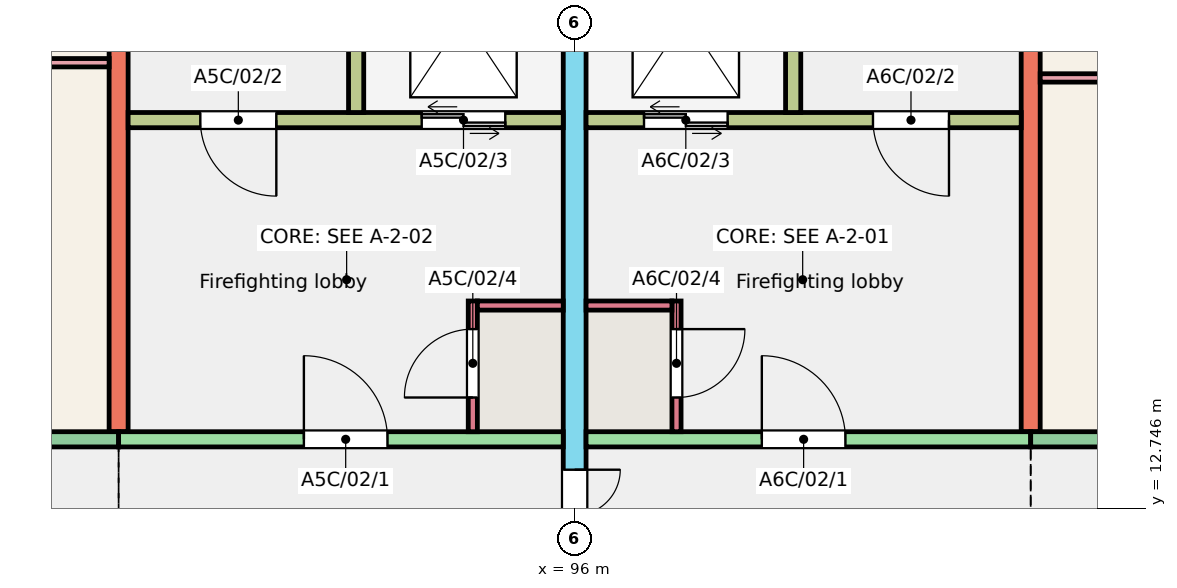
"""IFC4 building model, lengths in metres.
Left out: names, types, materials, properties, quantities, classifications, styles, units other than length and angle.
Written with IfcOpenShell. Run it as: python <this file> out.ifc"""

import sys

from ifc_helpers import new_model, si_unit, direction, frame, frame_2d, origin, place, context, subcontext, project, spatial, rectangle, extrude, element, fill, save


model = new_model("IFC4")
c1 = context("Model", 3, precision=1e-05, world=origin(), true_north=direction((0.0, 1.0)))
c2 = subcontext(c1, "Body", "Model", "MODEL_VIEW")
j1 = project(units=[si_unit("LENGTHUNIT", "METRE"), si_unit("PLANEANGLEUNIT", "RADIAN")], contexts=[c1])
p1 = place(None, origin())
s1 = spatial("IfcSite", under=j1, at=p1, CompositionType="ELEMENT")
p2 = place(p1, origin())
s2 = spatial("IfcBuilding", under=s1, at=p2, CompositionType="ELEMENT")
p3 = place(p2, frame((0.0, 0.0, 6.0)))
s3 = spatial("IfcBuildingStorey", under=s2, at=p3, CompositionType="ELEMENT", Elevation=6.0)
p4 = place(p3, frame((90.0, 13.75, 0.0), z_axis=(0.0, 0.0, 1.0), x_axis=(0.0, 1.0, 0.0)))
e1 = element("IfcWall", 1, at=p4, inside=s3, PredefinedType="SHEAR", context=c2, shape_type="SweptSolid", body=[
    extrude(rectangle(XDim=9.0, YDim=0.25, at=frame_2d((4.5, 0.0))), origin(), (0.0, 0.0, 1.0), 3.0),
])
p5 = place(p3, frame((96.0, 11.75, 0.0), z_axis=(0.0, 0.0, 1.0), x_axis=(0.0, 1.0, 0.0)))
e2 = element("IfcWall", 2, at=p5, inside=s3, PredefinedType="SHEAR", context=c2, shape_type="SweptSolid", body=[
    extrude(rectangle(XDim=11.0, YDim=0.3, at=frame_2d((5.5, 0.0))), origin(), (0.0, 0.0, 1.0), 3.0),
])
p6 = place(p5, frame((0.3, 0.0, 0.0)))
e3 = element("IfcOpeningElement", 3, at=p6, cuts=e2, PredefinedType="OPENING", context=c2, shape_type="SweptSolid", body=[
    extrude(rectangle(XDim=1.2, YDim=2.1, at=frame_2d((0.6, 1.05))), frame((0.0, 0.16, 0.0), z_axis=(0.0, -1.0, 0.0), x_axis=(1.0, 0.0, 0.0)), (0.0, 0.0, 1.0), 0.32),
])
p7 = place(p3, frame((102.0, 13.75, 0.0), z_axis=(0.0, 0.0, 1.0), x_axis=(0.0, 1.0, 0.0)))
e4 = element("IfcWall", 4, at=p7, inside=s3, PredefinedType="SHEAR", context=c2, shape_type="SweptSolid", body=[
    extrude(rectangle(XDim=9.0, YDim=0.25, at=frame_2d((4.5, 0.0))), origin(), (0.0, 0.0, 1.0), 3.0),
])
p8 = place(p3, frame((86.4, 13.65, 0.0), z_axis=(0.0, 0.0, 1.0), x_axis=(1.0, 0.0, 0.0)))
e5 = element("IfcWall", 5, at=p8, inside=s3, PredefinedType="SOLIDWALL", context=c2, shape_type="SweptSolid", body=[
    extrude(rectangle(XDim=3.6, YDim=0.2, at=frame_2d((1.8, 0.0))), origin(), (0.0, 0.0, 1.0), 3.0),
])
p9 = place(p8, frame((1.2, 0.0, 0.8)))
e6 = element("IfcOpeningElement", 6, at=p9, cuts=e5, PredefinedType="OPENING", context=c2, shape_type="SweptSolid", body=[
    extrude(rectangle(XDim=1.2, YDim=1.6, at=frame_2d((0.6, 0.8))), frame((0.0, 0.11, 0.0), z_axis=(0.0, -1.0, 0.0), x_axis=(1.0, 0.0, 0.0)), (0.0, 0.0, 1.0), 0.22),
])
p10 = place(p3, frame((90.0, 13.65, 0.0), z_axis=(0.0, 0.0, 1.0), x_axis=(1.0, 0.0, 0.0)))
e7 = element("IfcWall", 7, at=p10, inside=s3, PredefinedType="SHEAR", context=c2, shape_type="SweptSolid", body=[
    extrude(rectangle(XDim=5.85, YDim=0.2, at=frame_2d((2.925, 0.0))), origin(), (0.0, 0.0, 1.0), 3.0),
])
p11 = place(p10, frame((2.438, 0.0, 0.0)))
e8 = element("IfcOpeningElement", 8, at=p11, cuts=e7, PredefinedType="OPENING", context=c2, shape_type="SweptSolid", body=[
    extrude(rectangle(XDim=1.1, YDim=2.1, at=frame_2d((0.55, 1.05))), frame((0.0, 0.11, 0.0), z_axis=(0.0, -1.0, 0.0), x_axis=(1.0, 0.0, 0.0)), (0.0, 0.0, 1.0), 0.22),
])
p12 = place(p3, frame((90.125, 17.85, 0.0), z_axis=(0.0, 0.0, 1.0), x_axis=(1.0, 0.0, 0.0)))
e9 = element("IfcWall", 9, at=p12, inside=s3, PredefinedType="SHEAR", context=c2, shape_type="SweptSolid", body=[
    extrude(rectangle(XDim=5.725, YDim=0.2, at=frame_2d((2.863, 0.0))), origin(), (0.0, 0.0, 1.0), 3.0),
])
p13 = place(p12, frame((0.95, 0.0, 0.0)))
e10 = element("IfcOpeningElement", 10, at=p13, cuts=e9, PredefinedType="OPENING", context=c2, shape_type="SweptSolid", body=[
    extrude(rectangle(XDim=1.0, YDim=2.1, at=frame_2d((0.5, 1.05))), frame((0.0, 0.11, 0.0), z_axis=(0.0, -1.0, 0.0), x_axis=(1.0, 0.0, 0.0)), (0.0, 0.0, 1.0), 0.22),
])
p14 = place(p12, frame((3.863, 0.0, 0.0)))
e11 = element("IfcOpeningElement", 11, at=p14, cuts=e9, PredefinedType="OPENING", context=c2, shape_type="SweptSolid", body=[
    extrude(rectangle(XDim=1.1, YDim=2.1, at=frame_2d((0.55, 1.05))), frame((0.0, 0.11, 0.0), z_axis=(0.0, -1.0, 0.0), x_axis=(1.0, 0.0, 0.0)), (0.0, 0.0, 1.0), 0.22),
])
p15 = place(p3, frame((93.125, 17.95, 0.0), z_axis=(0.0, 0.0, 1.0), x_axis=(0.0, 1.0, 0.0)))
e12 = element("IfcWall", 12, at=p15, inside=s3, PredefinedType="SHEAR", context=c2, shape_type="SweptSolid", body=[
    extrude(rectangle(XDim=4.8, YDim=0.2, at=frame_2d((2.4, 0.0))), origin(), (0.0, 0.0, 1.0), 3.0),
])
p16 = place(p3, frame((94.66, 13.75, 0.0), z_axis=(0.0, 0.0, 1.0), x_axis=(0.0, 1.0, 0.0)))
e13 = element("IfcWall", 13, at=p16, inside=s3, PredefinedType="SHEAR", context=c2, shape_type="SweptSolid", body=[
    extrude(rectangle(XDim=1.72, YDim=0.12, at=frame_2d((0.86, 0.0))), origin(), (0.0, 0.0, 1.0), 3.0),
])
p17 = place(p16, frame((0.45, 0.0, 0.0)))
e14 = element("IfcOpeningElement", 14, at=p17, cuts=e13, PredefinedType="OPENING", context=c2, shape_type="SweptSolid", body=[
    extrude(rectangle(XDim=0.9, YDim=2.1, at=frame_2d((0.45, 1.05))), frame((0.0, 0.07, 0.0), z_axis=(0.0, -1.0, 0.0), x_axis=(1.0, 0.0, 0.0)), (0.0, 0.0, 1.0), 0.14),
])
p18 = place(p3, frame((94.72, 15.41, 0.0), z_axis=(0.0, 0.0, 1.0), x_axis=(1.0, 0.0, 0.0)))
e15 = element("IfcWall", 15, at=p18, inside=s3, PredefinedType="SHEAR", context=c2, shape_type="SweptSolid", body=[
    extrude(rectangle(XDim=1.13, YDim=0.12, at=frame_2d((0.565, 0.0))), origin(), (0.0, 0.0, 1.0), 3.0),
])
p19 = place(p3, frame((96.15, 13.65, 0.0), z_axis=(0.0, 0.0, 1.0), x_axis=(1.0, 0.0, 0.0)))
e16 = element("IfcWall", 16, at=p19, inside=s3, PredefinedType="SHEAR", context=c2, shape_type="SweptSolid", body=[
    extrude(rectangle(XDim=5.85, YDim=0.2, at=frame_2d((2.925, 0.0))), origin(), (0.0, 0.0, 1.0), 3.0),
])
p20 = place(p19, frame((2.312, 0.0, 0.0)))
e17 = element("IfcOpeningElement", 17, at=p20, cuts=e16, PredefinedType="OPENING", context=c2, shape_type="SweptSolid", body=[
    extrude(rectangle(XDim=1.1, YDim=2.1, at=frame_2d((0.55, 1.05))), frame((0.0, 0.11, 0.0), z_axis=(0.0, -1.0, 0.0), x_axis=(1.0, 0.0, 0.0)), (0.0, 0.0, 1.0), 0.22),
])
p21 = place(p3, frame((96.15, 17.85, 0.0), z_axis=(0.0, 0.0, 1.0), x_axis=(1.0, 0.0, 0.0)))
e18 = element("IfcWall", 18, at=p21, inside=s3, PredefinedType="SHEAR", context=c2, shape_type="SweptSolid", body=[
    extrude(rectangle(XDim=5.725, YDim=0.2, at=frame_2d((2.863, 0.0))), origin(), (0.0, 0.0, 1.0), 3.0),
])
p22 = place(p21, frame((3.775, 0.0, 0.0)))
e19 = element("IfcOpeningElement", 19, at=p22, cuts=e18, PredefinedType="OPENING", context=c2, shape_type="SweptSolid", body=[
    extrude(rectangle(XDim=1.0, YDim=2.1, at=frame_2d((0.5, 1.05))), frame((0.0, 0.11, 0.0), z_axis=(0.0, -1.0, 0.0), x_axis=(1.0, 0.0, 0.0)), (0.0, 0.0, 1.0), 0.22),
])
p23 = place(p21, frame((0.762, 0.0, 0.0)))
e20 = element("IfcOpeningElement", 20, at=p23, cuts=e18, PredefinedType="OPENING", context=c2, shape_type="SweptSolid", body=[
    extrude(rectangle(XDim=1.1, YDim=2.1, at=frame_2d((0.55, 1.05))), frame((0.0, 0.11, 0.0), z_axis=(0.0, -1.0, 0.0), x_axis=(1.0, 0.0, 0.0)), (0.0, 0.0, 1.0), 0.22),
])
p24 = place(p3, frame((98.875, 17.95, 0.0), z_axis=(0.0, 0.0, 1.0), x_axis=(0.0, 1.0, 0.0)))
e21 = element("IfcWall", 21, at=p24, inside=s3, PredefinedType="SHEAR", context=c2, shape_type="SweptSolid", body=[
    extrude(rectangle(XDim=4.8, YDim=0.2, at=frame_2d((2.4, 0.0))), origin(), (0.0, 0.0, 1.0), 3.0),
])
p25 = place(p3, frame((97.34, 13.75, 0.0), z_axis=(0.0, 0.0, 1.0), x_axis=(0.0, 1.0, 0.0)))
e22 = element("IfcWall", 22, at=p25, inside=s3, PredefinedType="SHEAR", context=c2, shape_type="SweptSolid", body=[
    extrude(rectangle(XDim=1.72, YDim=0.12, at=frame_2d((0.86, 0.0))), origin(), (0.0, 0.0, 1.0), 3.0),
])
p26 = place(p25, frame((0.45, 0.0, 0.0)))
e23 = element("IfcOpeningElement", 23, at=p26, cuts=e22, PredefinedType="OPENING", context=c2, shape_type="SweptSolid", body=[
    extrude(rectangle(XDim=0.9, YDim=2.1, at=frame_2d((0.45, 1.05))), frame((0.0, 0.07, 0.0), z_axis=(0.0, -1.0, 0.0), x_axis=(1.0, 0.0, 0.0)), (0.0, 0.0, 1.0), 0.14),
])
p27 = place(p3, frame((96.15, 15.41, 0.0), z_axis=(0.0, 0.0, 1.0), x_axis=(1.0, 0.0, 0.0)))
e24 = element("IfcWall", 24, at=p27, inside=s3, PredefinedType="SHEAR", context=c2, shape_type="SweptSolid", body=[
    extrude(rectangle(XDim=1.13, YDim=0.12, at=frame_2d((0.565, 0.0))), origin(), (0.0, 0.0, 1.0), 3.0),
])
p28 = place(p3, frame((102.0, 13.65, 0.0), z_axis=(0.0, 0.0, 1.0), x_axis=(1.0, 0.0, 0.0)))
e25 = element("IfcWall", 25, at=p28, inside=s3, PredefinedType="SOLIDWALL", context=c2, shape_type="SweptSolid", body=[
    extrude(rectangle(XDim=3.6, YDim=0.2, at=frame_2d((1.8, 0.0))), origin(), (0.0, 0.0, 1.0), 3.0),
])
p29 = place(p28, frame((1.2, 0.0, 0.8)))
e26 = element("IfcOpeningElement", 26, at=p29, cuts=e25, PredefinedType="OPENING", context=c2, shape_type="SweptSolid", body=[
    extrude(rectangle(XDim=1.2, YDim=1.6, at=frame_2d((0.6, 0.8))), frame((0.0, 0.11, 0.0), z_axis=(0.0, -1.0, 0.0), x_axis=(1.0, 0.0, 0.0)), (0.0, 0.0, 1.0), 0.22),
])
for number, where, z_axis, x_axis in (
    (27, (86.525, 18.605, 0.0), (0.0, 0.0, 1.0), (1.0, 0.0, 0.0)),
    (28, (102.125, 18.405, 0.0), (0.0, 0.0, 1.0), (1.0, 0.0, 0.0)),
):
    element("IfcWall", number, at=place(p3, frame(where, z_axis=z_axis, x_axis=x_axis)), inside=s3, PredefinedType="PARTITIONING", context=c2, shape_type="SweptSolid", body=[
        extrude(rectangle(XDim=3.35, YDim=0.11, at=frame_2d((1.675, 0.0))), origin(), (0.0, 0.0, 1.0), 2.8),
    ])
p30 = place(p11, origin())
e29 = element("IfcDoor", 29, at=p30, inside=s3, OperationType="SINGLE_SWING_LEFT", PredefinedType="DOOR", context=c2, shape_type="SweptSolid", body=[
    extrude(rectangle(XDim=1.1, YDim=2.1, at=frame_2d((0.55, 1.05))), frame((0.0, 0.025, 0.0), z_axis=(0.0, -1.0, 0.0), x_axis=(1.0, 0.0, 0.0)), (0.0, 0.0, 1.0), 0.05),
])
fill(e8, e29)
p31 = place(p13, origin())
e30 = element("IfcDoor", 30, at=p31, inside=s3, OperationType="SINGLE_SWING_RIGHT", PredefinedType="DOOR", context=c2, shape_type="SweptSolid", body=[
    extrude(rectangle(XDim=1.0, YDim=2.1, at=frame_2d((0.5, 1.05))), frame((0.0, 0.025, 0.0), z_axis=(0.0, -1.0, 0.0), x_axis=(1.0, 0.0, 0.0)), (0.0, 0.0, 1.0), 0.05),
])
fill(e10, e30)
p32 = place(p14, origin())
e31 = element("IfcDoor", 31, at=p32, inside=s3, OperationType="DOUBLE_DOOR_SLIDING", PredefinedType="DOOR", context=c2, shape_type="SweptSolid", body=[
    extrude(rectangle(XDim=1.1, YDim=2.1, at=frame_2d((0.55, 1.05))), frame((0.0, 0.025, 0.0), z_axis=(0.0, -1.0, 0.0), x_axis=(1.0, 0.0, 0.0)), (0.0, 0.0, 1.0), 0.05),
])
fill(e11, e31)
p33 = place(p17, origin())
e32 = element("IfcDoor", 32, at=p33, inside=s3, OperationType="SINGLE_SWING_LEFT", PredefinedType="DOOR", context=c2, shape_type="SweptSolid", body=[
    extrude(rectangle(XDim=0.9, YDim=2.1, at=frame_2d((0.45, 1.05))), frame((0.0, 0.025, 0.0), z_axis=(0.0, -1.0, 0.0), x_axis=(1.0, 0.0, 0.0)), (0.0, 0.0, 1.0), 0.05),
])
fill(e14, e32)
p34 = place(p20, origin())
e33 = element("IfcDoor", 33, at=p34, inside=s3, OperationType="SINGLE_SWING_LEFT", PredefinedType="DOOR", context=c2, shape_type="SweptSolid", body=[
    extrude(rectangle(XDim=1.1, YDim=2.1, at=frame_2d((0.55, 1.05))), frame((0.0, 0.025, 0.0), z_axis=(0.0, -1.0, 0.0), x_axis=(1.0, 0.0, 0.0)), (0.0, 0.0, 1.0), 0.05),
])
fill(e17, e33)
p35 = place(p22, origin())
e34 = element("IfcDoor", 34, at=p35, inside=s3, OperationType="SINGLE_SWING_RIGHT", PredefinedType="DOOR", context=c2, shape_type="SweptSolid", body=[
    extrude(rectangle(XDim=1.0, YDim=2.1, at=frame_2d((0.5, 1.05))), frame((0.0, 0.025, 0.0), z_axis=(0.0, -1.0, 0.0), x_axis=(1.0, 0.0, 0.0)), (0.0, 0.0, 1.0), 0.05),
])
fill(e19, e34)
p36 = place(p23, origin())
e35 = element("IfcDoor", 35, at=p36, inside=s3, OperationType="DOUBLE_DOOR_SLIDING", PredefinedType="DOOR", context=c2, shape_type="SweptSolid", body=[
    extrude(rectangle(XDim=1.1, YDim=2.1, at=frame_2d((0.55, 1.05))), frame((0.0, 0.025, 0.0), z_axis=(0.0, -1.0, 0.0), x_axis=(1.0, 0.0, 0.0)), (0.0, 0.0, 1.0), 0.05),
])
fill(e20, e35)
p37 = place(p26, origin())
e36 = element("IfcDoor", 36, at=p37, inside=s3, OperationType="SINGLE_SWING_RIGHT", PredefinedType="DOOR", context=c2, shape_type="SweptSolid", body=[
    extrude(rectangle(XDim=0.9, YDim=2.1, at=frame_2d((0.45, 1.05))), frame((0.0, 0.025, 0.0), z_axis=(0.0, -1.0, 0.0), x_axis=(1.0, 0.0, 0.0)), (0.0, 0.0, 1.0), 0.05),
])
fill(e23, e36)
p38 = place(p6, origin())
e37 = element("IfcDoor", 37, at=p38, inside=s3, OperationType="DOUBLE_DOOR_SINGLE_SWING", PredefinedType="DOOR", context=c2, shape_type="SweptSolid", body=[
    extrude(rectangle(XDim=1.2, YDim=2.1, at=frame_2d((0.6, 1.05))), frame((0.0, 0.025, 0.0), z_axis=(0.0, -1.0, 0.0), x_axis=(1.0, 0.0, 0.0)), (0.0, 0.0, 1.0), 0.05),
])
fill(e3, e37)
save(model, sys.argv[1])
